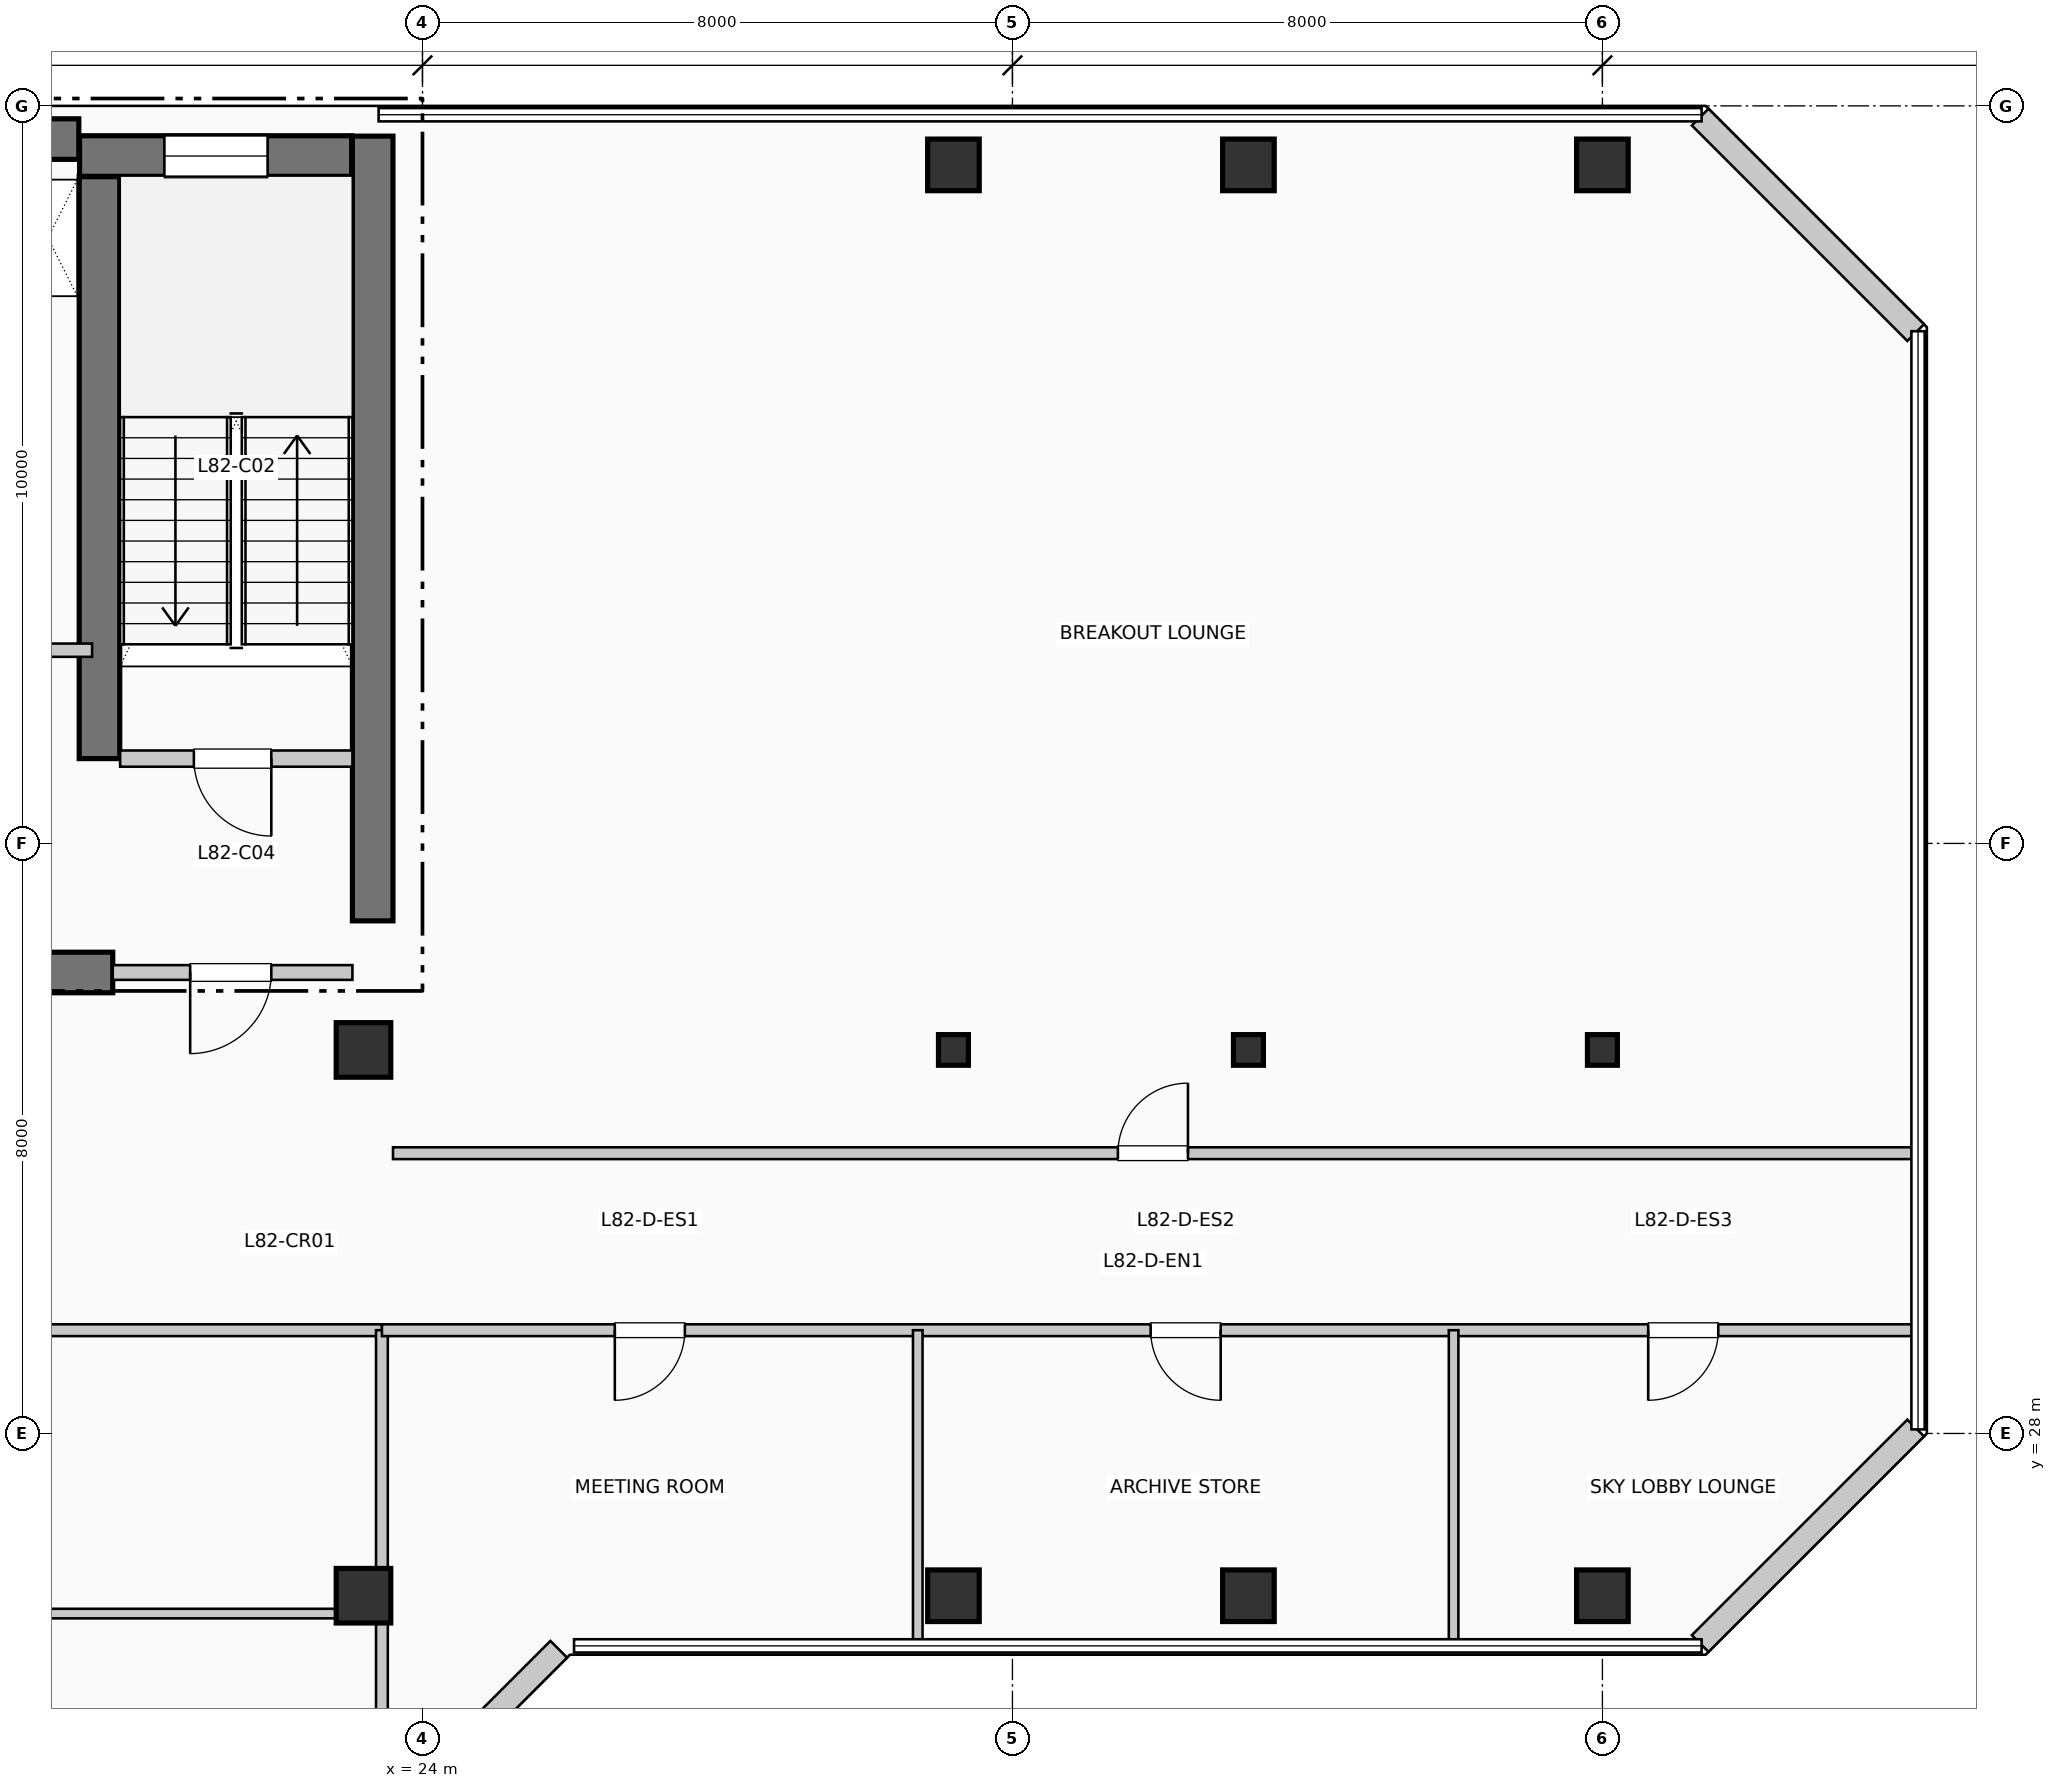
"""IFC4 building model, lengths in metres.
Left out: names, types, materials, properties, quantities, classifications, styles, units other than length and angle.
Written with IfcOpenShell. Run it as: python <this file> out.ifc"""

import sys

from ifc_helpers import new_model, si_unit, direction, frame, frame_2d, origin, origin_2d, place, context, subcontext, project, spatial, rectangle, i_section, extrude, element, fill, save


model = new_model("IFC4")
c1 = context("Model", 3, precision=1e-05, world=origin(), true_north=direction((0.0, 1.0)))
c2 = subcontext(c1, "Body", "Model", "MODEL_VIEW")
j1 = project(units=[si_unit("LENGTHUNIT", "METRE"), si_unit("PLANEANGLEUNIT", "RADIAN")], contexts=[c1])
p1 = place(None, origin())
s1 = spatial("IfcSite", under=j1, at=p1, CompositionType="ELEMENT")
p2 = place(p1, origin())
s2 = spatial("IfcBuilding", under=s1, at=p2, CompositionType="ELEMENT")
p3 = place(p2, frame((0.0, 0.0, 335.61)))
s3 = spatial("IfcBuildingStorey", under=s2, at=p3, CompositionType="ELEMENT", Elevation=335.61)
p4 = place(p3, frame((5.36, 45.55, 0.0), z_axis=(0.0, 0.0, 1.0), x_axis=(1.0, 0.0, 0.0)))
e1 = element("IfcWall", 1, at=p4, inside=s3, PredefinedType="SHEAR", context=c2, shape_type="SweptSolid", body=[
    extrude(rectangle(XDim=13.98, YDim=0.55, at=frame_2d((6.99, 0.0))), origin(), (0.0, 0.0, 1.0), 3.96),
])
p5 = place(p3, frame((23.325, 34.95, 0.0), z_axis=(0.0, 0.0, 1.0), x_axis=(0.0, 1.0, 0.0)))
e2 = element("IfcWall", 2, at=p5, inside=s3, PredefinedType="SHEAR", context=c2, shape_type="SweptSolid", body=[
    extrude(rectangle(XDim=10.64, YDim=0.55, at=frame_2d((5.32, 0.0))), origin(), (0.0, 0.0, 1.0), 3.96),
])
p6 = place(p3, frame((13.68, 34.25, 0.0), z_axis=(0.0, 0.0, 1.0), x_axis=(1.0, 0.0, 0.0)))
e3 = element("IfcWall", 3, at=p6, inside=s3, PredefinedType="SHEAR", context=c2, shape_type="SweptSolid", body=[
    extrude(rectangle(XDim=6.12, YDim=0.55, at=frame_2d((3.06, 0.0))), origin(), (0.0, 0.0, 1.0), 3.96),
])
p7 = place(p3, frame((19.62, 37.15, 0.0), z_axis=(0.0, 0.0, 1.0), x_axis=(0.0, 1.0, 0.0)))
e4 = element("IfcWall", 4, at=p7, inside=s3, PredefinedType="SHEAR", context=c2, shape_type="SweptSolid", body=[
    extrude(rectangle(XDim=7.89, YDim=0.55, at=frame_2d((3.945, 0.0))), origin(), (0.0, 0.0, 1.0), 3.96),
])
p8 = place(p3, frame((19.35, 45.32, 0.0), z_axis=(0.0, 0.0, 1.0), x_axis=(1.0, 0.0, 0.0)))
e5 = element("IfcWall", 5, at=p8, inside=s3, PredefinedType="SHEAR", context=c2, shape_type="SweptSolid", body=[
    extrude(rectangle(XDim=3.69, YDim=0.55, at=frame_2d((1.845, 0.0))), origin(), (0.0, 0.0, 1.0), 3.96),
])
p9 = place(p8, frame((1.15, 0.0, 1.05)))
e6 = element("IfcOpeningElement", 6, at=p9, cuts=e5, PredefinedType="OPENING", context=c2, shape_type="SweptSolid", body=[
    extrude(rectangle(XDim=1.4, YDim=1.8, at=frame_2d((0.7, 0.9))), frame((0.0, 0.285, 0.0), z_axis=(0.0, -1.0, 0.0), x_axis=(1.0, 0.0, 0.0)), (0.0, 0.0, 1.0), 0.57),
])
for number, where, z_axis, x_axis in (
    (7, (23.2, 25.8, 0.0), (0.0, 0.0, 1.0), (1.0, 0.0, 0.0)),
    (8, (23.2, 33.2, 0.0), (0.0, 0.0, 1.0), (1.0, 0.0, 0.0)),
):
    element("IfcColumn", number, at=place(p3, frame(where, z_axis=z_axis, x_axis=x_axis)), inside=s3, PredefinedType="COLUMN", context=c2, shape_type="SweptSolid", body=[
        extrude(rectangle(XDim=0.74, YDim=0.74, at=origin_2d()), origin(), (0.0, 0.0, 1.0), 3.96),
    ])
p10 = place(p3, frame((31.2, 25.8, 0.0), z_axis=(0.0, 0.0, 1.0), x_axis=(1.0, 0.0, 0.0)))
e9 = element("IfcColumn", 9, at=p10, inside=s3, PredefinedType="COLUMN", context=c2, shape_type="SweptSolid", body=[
    extrude(rectangle(XDim=0.7, YDim=0.7, at=origin_2d()), origin(), (0.0, 0.0, 1.0), 3.96),
])
p11 = place(p3, frame((31.2, 33.2, 0.0), z_axis=(0.0, 0.0, 1.0), x_axis=(1.0, 0.0, 0.0)))
e10 = element("IfcColumn", 10, at=p11, inside=s3, PredefinedType="COLUMN", context=c2, shape_type="SweptSolid", body=[
    extrude(i_section(OverallWidth=0.406, OverallDepth=0.416, WebThickness=0.022, FlangeThickness=0.036, at=origin_2d()), origin(), (0.0, 0.0, 1.0), 3.96),
])
for number, where, z_axis, x_axis in (
    (11, (31.2, 45.2, 0.0), (0.0, 0.0, 1.0), (1.0, 0.0, 0.0)),
    (12, (35.2, 25.8, 0.0), (0.0, 0.0, 1.0), (1.0, 0.0, 0.0)),
):
    element("IfcColumn", number, at=place(p3, frame(where, z_axis=z_axis, x_axis=x_axis)), inside=s3, PredefinedType="COLUMN", context=c2, shape_type="SweptSolid", body=[
        extrude(rectangle(XDim=0.7, YDim=0.7, at=origin_2d()), origin(), (0.0, 0.0, 1.0), 3.96),
    ])
p12 = place(p3, frame((35.2, 33.2, 0.0), z_axis=(0.0, 0.0, 1.0), x_axis=(1.0, 0.0, 0.0)))
e13 = element("IfcColumn", 13, at=p12, inside=s3, PredefinedType="COLUMN", context=c2, shape_type="SweptSolid", body=[
    extrude(i_section(OverallWidth=0.406, OverallDepth=0.416, WebThickness=0.022, FlangeThickness=0.036, at=origin_2d()), origin(), (0.0, 0.0, 1.0), 3.96),
])
for number, where, z_axis, x_axis in (
    (14, (35.2, 45.2, 0.0), (0.0, 0.0, 1.0), (1.0, 0.0, 0.0)),
    (15, (40.0, 25.8, 0.0), (0.0, 0.0, 1.0), (1.0, 0.0, 0.0)),
):
    element("IfcColumn", number, at=place(p3, frame(where, z_axis=z_axis, x_axis=x_axis)), inside=s3, PredefinedType="COLUMN", context=c2, shape_type="SweptSolid", body=[
        extrude(rectangle(XDim=0.7, YDim=0.7, at=origin_2d()), origin(), (0.0, 0.0, 1.0), 3.96),
    ])
p13 = place(p3, frame((40.0, 33.2, 0.0), z_axis=(0.0, 0.0, 1.0), x_axis=(1.0, 0.0, 0.0)))
e16 = element("IfcColumn", 16, at=p13, inside=s3, PredefinedType="COLUMN", context=c2, shape_type="SweptSolid", body=[
    extrude(i_section(OverallWidth=0.406, OverallDepth=0.416, WebThickness=0.022, FlangeThickness=0.036, at=origin_2d()), origin(), (0.0, 0.0, 1.0), 3.96),
])
p14 = place(p3, frame((40.0, 45.2, 0.0), z_axis=(0.0, 0.0, 1.0), x_axis=(1.0, 0.0, 0.0)))
e17 = element("IfcColumn", 17, at=p14, inside=s3, PredefinedType="COLUMN", context=c2, shape_type="SweptSolid", body=[
    extrude(rectangle(XDim=0.7, YDim=0.7, at=origin_2d()), origin(), (0.0, 0.0, 1.0), 3.96),
])
p15 = place(p3, frame((23.926, 23.152, 0.0), z_axis=(0.0, 0.0, 1.0), x_axis=(0.707106781187, 0.707106781187, 0.0)))
e18 = element("IfcWall", 18, at=p15, inside=s3, PredefinedType="SOLIDWALL", context=c2, shape_type="SweptSolid", body=[
    extrude(rectangle(XDim=2.718, YDim=0.32, at=frame_2d((1.359, 0.0))), origin(), (0.0, 0.0, 1.0), 3.74),
])
for number, where, z_axis, x_axis in (
    (19, (41.326, 25.152, 0.0), (0.0, 0.0, 1.0), (0.707, 0.707, 0.0)),
    (20, (44.248, 42.926, 0.0), (0.0, 0.0, 1.0), (-0.707, 0.707, 0.0)),
):
    element("IfcWall", number, at=place(p3, frame(where, z_axis=z_axis, x_axis=x_axis)), inside=s3, PredefinedType="SOLIDWALL", context=c2, shape_type="SweptSolid", body=[
        extrude(rectangle(XDim=4.133, YDim=0.32, at=frame_2d((2.066, 0.0))), origin(), (0.0, 0.0, 1.0), 3.74),
    ])
p16 = place(p3, frame((19.9, 37.15, 0.0), z_axis=(0.0, 0.0, 1.0), x_axis=(1.0, 0.0, 0.0)))
e21 = element("IfcWall", 21, at=p16, inside=s3, PredefinedType="PARTITIONING", context=c2, shape_type="SweptSolid", body=[
    extrude(rectangle(XDim=3.15, YDim=0.22, at=frame_2d((1.575, 0.0))), origin(), (0.0, 0.0, 1.0), 3.74),
])
p17 = place(p16, frame((2.05, 0.0, 0.0), z_axis=(0.0, 0.0, 1.0), x_axis=(-1.0, 0.0, 0.0)))
e22 = element("IfcOpeningElement", 22, at=p17, cuts=e21, PredefinedType="OPENING", context=c2, shape_type="SweptSolid", body=[
    extrude(rectangle(XDim=1.05, YDim=2.15, at=frame_2d((0.525, 1.075))), frame((0.0, 0.12, 0.0), z_axis=(0.0, -1.0, 0.0), x_axis=(1.0, 0.0, 0.0)), (0.0, 0.0, 1.0), 0.24),
])
p18 = place(p3, frame((19.8, 34.25, 0.0), z_axis=(0.0, 0.0, 1.0), x_axis=(1.0, 0.0, 0.0)))
e23 = element("IfcWall", 23, at=p18, inside=s3, PredefinedType="PARTITIONING", context=c2, shape_type="SweptSolid", body=[
    extrude(rectangle(XDim=3.25, YDim=0.2, at=frame_2d((1.625, 0.0))), origin(), (0.0, 0.0, 1.0), 3.74),
])
p19 = place(p18, frame((2.15, 0.0, 0.0), z_axis=(0.0, 0.0, 1.0), x_axis=(-1.0, 0.0, 0.0)))
e24 = element("IfcOpeningElement", 24, at=p19, cuts=e23, PredefinedType="OPENING", context=c2, shape_type="SweptSolid", body=[
    extrude(rectangle(XDim=1.1, YDim=2.15, at=frame_2d((0.55, 1.075))), frame((0.0, 0.11, 0.0), z_axis=(0.0, -1.0, 0.0), x_axis=(1.0, 0.0, 0.0)), (0.0, 0.0, 1.0), 0.22),
])
p20 = place(p3, frame((17.68, 38.62, 0.0), z_axis=(0.0, 0.0, 1.0), x_axis=(1.0, 0.0, 0.0)))
e25 = element("IfcWall", 25, at=p20, inside=s3, PredefinedType="PARTITIONING", context=c2, shape_type="SweptSolid", body=[
    extrude(rectangle(XDim=1.84, YDim=0.18, at=frame_2d((0.92, 0.0))), origin(), (0.0, 0.0, 1.0), 3.74),
])
p21 = place(p20, frame((0.24, 0.0, 0.0)))
e26 = element("IfcOpeningElement", 26, at=p21, cuts=e25, PredefinedType="OPENING", context=c2, shape_type="SweptSolid", body=[
    extrude(rectangle(XDim=0.92, YDim=2.1, at=frame_2d((0.46, 1.05))), frame((0.0, 0.1, 0.0), z_axis=(0.0, -1.0, 0.0), x_axis=(1.0, 0.0, 0.0)), (0.0, 0.0, 1.0), 0.2),
])
p22 = place(p3, frame((6.4, 29.4, 0.0), z_axis=(0.0, 0.0, 1.0), x_axis=(1.0, 0.0, 0.0)))
e27 = element("IfcWall", 27, at=p22, inside=s3, PredefinedType="PARTITIONING", context=c2, shape_type="SweptSolid", body=[
    extrude(rectangle(XDim=17.05, YDim=0.16, at=frame_2d((8.525, 0.0))), origin(), (0.0, 0.0, 1.0), 3.425),
])
p23 = place(p3, frame((23.45, 5.99, 0.0), z_axis=(0.0, 0.0, 1.0), x_axis=(0.0, 1.0, 0.0)))
e28 = element("IfcWall", 28, at=p23, inside=s3, PredefinedType="PARTITIONING", context=c2, shape_type="SweptSolid", body=[
    extrude(rectangle(XDim=23.41, YDim=0.16, at=frame_2d((11.705, 0.0))), origin(), (0.0, 0.0, 1.0), 3.175),
])
p24 = place(p3, frame((6.4, 25.558, 0.0), z_axis=(0.0, 0.0, 1.0), x_axis=(1.0, 0.0, 0.0)))
e29 = element("IfcWall", 29, at=p24, inside=s3, PredefinedType="PARTITIONING", context=c2, shape_type="SweptSolid", body=[
    extrude(rectangle(XDim=17.05, YDim=0.13, at=frame_2d((8.525, 0.0))), origin(), (0.0, 0.0, 1.0), 3.175),
])
p25 = place(p3, frame((23.45, 29.4, 0.0), z_axis=(0.0, 0.0, 1.0), x_axis=(1.0, 0.0, 0.0)))
e30 = element("IfcWall", 30, at=p25, inside=s3, PredefinedType="PARTITIONING", context=c2, shape_type="SweptSolid", body=[
    extrude(rectangle(XDim=20.76, YDim=0.16, at=frame_2d((10.38, 0.0))), origin(), (0.0, 0.0, 1.0), 3.425),
])
p26 = place(p25, frame((4.108, 0.0, 0.0), z_axis=(0.0, 0.0, 1.0), x_axis=(-1.0, 0.0, 0.0)))
e31 = element("IfcOpeningElement", 31, at=p26, cuts=e30, PredefinedType="OPENING", context=c2, shape_type="SweptSolid", body=[
    extrude(rectangle(XDim=0.95, YDim=2.15, at=frame_2d((0.475, 1.075))), frame((0.0, 0.09, 0.0), z_axis=(0.0, -1.0, 0.0), x_axis=(1.0, 0.0, 0.0)), (0.0, 0.0, 1.0), 0.18),
])
p27 = place(p25, frame((11.374, 0.0, 0.0), z_axis=(0.0, 0.0, 1.0), x_axis=(-1.0, 0.0, 0.0)))
e32 = element("IfcOpeningElement", 32, at=p27, cuts=e30, PredefinedType="OPENING", context=c2, shape_type="SweptSolid", body=[
    extrude(rectangle(XDim=0.95, YDim=2.15, at=frame_2d((0.475, 1.075))), frame((0.0, 0.09, 0.0), z_axis=(0.0, -1.0, 0.0), x_axis=(1.0, 0.0, 0.0)), (0.0, 0.0, 1.0), 0.18),
])
p28 = place(p25, frame((18.121, 0.0, 0.0), z_axis=(0.0, 0.0, 1.0), x_axis=(-1.0, 0.0, 0.0)))
e33 = element("IfcOpeningElement", 33, at=p28, cuts=e30, PredefinedType="OPENING", context=c2, shape_type="SweptSolid", body=[
    extrude(rectangle(XDim=0.95, YDim=2.15, at=frame_2d((0.475, 1.075))), frame((0.0, 0.09, 0.0), z_axis=(0.0, -1.0, 0.0), x_axis=(1.0, 0.0, 0.0)), (0.0, 0.0, 1.0), 0.18),
])
p29 = place(p3, frame((23.6, 31.8, 0.0), z_axis=(0.0, 0.0, 1.0), x_axis=(1.0, 0.0, 0.0)))
e34 = element("IfcWall", 34, at=p29, inside=s3, PredefinedType="PARTITIONING", context=c2, shape_type="SweptSolid", body=[
    extrude(rectangle(XDim=20.61, YDim=0.16, at=frame_2d((10.305, 0.0))), origin(), (0.0, 0.0, 1.0), 3.74),
])
p30 = place(p29, frame((9.83, 0.0, 0.0)))
e35 = element("IfcOpeningElement", 35, at=p30, cuts=e34, PredefinedType="OPENING", context=c2, shape_type="SweptSolid", body=[
    extrude(rectangle(XDim=0.95, YDim=2.15, at=frame_2d((0.475, 1.075))), frame((0.0, 0.09, 0.0), z_axis=(0.0, -1.0, 0.0), x_axis=(1.0, 0.0, 0.0)), (0.0, 0.0, 1.0), 0.18),
])
for number, where, z_axis, x_axis in (
    (36, (30.716, 25.19, 0.0), (0.0, 0.0, 1.0), (0.0, 1.0, 0.0)),
    (37, (37.982, 25.19, 0.0), (0.0, 0.0, 1.0), (0.0, 1.0, 0.0)),
):
    element("IfcWall", number, at=place(p3, frame(where, z_axis=z_axis, x_axis=x_axis)), inside=s3, PredefinedType="PARTITIONING", context=c2, shape_type="SweptSolid", body=[
        extrude(rectangle(XDim=4.21, YDim=0.13, at=frame_2d((2.105, 0.0))), origin(), (0.0, 0.0, 1.0), 3.74),
    ])
p31 = place(p9, origin())
e38 = element("IfcWindow", 38, at=p31, inside=s3, PartitioningType="SINGLE_PANEL", PredefinedType="WINDOW", context=c2, shape_type="SweptSolid", body=[
    extrude(rectangle(XDim=1.4, YDim=1.8, at=frame_2d((0.7, 0.9))), frame((0.0, 0.03, 0.0), z_axis=(0.0, -1.0, 0.0), x_axis=(1.0, 0.0, 0.0)), (0.0, 0.0, 1.0), 0.06),
])
fill(e6, e38)
p32 = place(p17, origin())
e39 = element("IfcDoor", 39, at=p32, inside=s3, OperationType="SINGLE_SWING_RIGHT", PredefinedType="DOOR", context=c2, shape_type="SweptSolid", body=[
    extrude(rectangle(XDim=1.05, YDim=2.15, at=frame_2d((0.525, 1.075))), frame((0.0, 0.025, 0.0), z_axis=(0.0, -1.0, 0.0), x_axis=(1.0, 0.0, 0.0)), (0.0, 0.0, 1.0), 0.05),
])
fill(e22, e39)
p33 = place(p19, origin())
e40 = element("IfcDoor", 40, at=p33, inside=s3, OperationType="SINGLE_SWING_LEFT", PredefinedType="DOOR", context=c2, shape_type="SweptSolid", body=[
    extrude(rectangle(XDim=1.1, YDim=2.15, at=frame_2d((0.55, 1.075))), frame((0.0, 0.025, 0.0), z_axis=(0.0, -1.0, 0.0), x_axis=(1.0, 0.0, 0.0)), (0.0, 0.0, 1.0), 0.05),
])
fill(e24, e40)
p34 = place(p26, origin())
e41 = element("IfcDoor", 41, at=p34, inside=s3, OperationType="SINGLE_SWING_LEFT", PredefinedType="DOOR", context=c2, shape_type="SweptSolid", body=[
    extrude(rectangle(XDim=0.95, YDim=2.15, at=frame_2d((0.475, 1.075))), frame((0.0, 0.025, 0.0), z_axis=(0.0, -1.0, 0.0), x_axis=(1.0, 0.0, 0.0)), (0.0, 0.0, 1.0), 0.05),
])
fill(e31, e41)
p35 = place(p27, origin())
e42 = element("IfcDoor", 42, at=p35, inside=s3, OperationType="SINGLE_SWING_RIGHT", PredefinedType="DOOR", context=c2, shape_type="SweptSolid", body=[
    extrude(rectangle(XDim=0.95, YDim=2.15, at=frame_2d((0.475, 1.075))), frame((0.0, 0.025, 0.0), z_axis=(0.0, -1.0, 0.0), x_axis=(1.0, 0.0, 0.0)), (0.0, 0.0, 1.0), 0.05),
])
fill(e32, e42)
p36 = place(p28, origin())
e43 = element("IfcDoor", 43, at=p36, inside=s3, OperationType="SINGLE_SWING_LEFT", PredefinedType="DOOR", context=c2, shape_type="SweptSolid", body=[
    extrude(rectangle(XDim=0.95, YDim=2.15, at=frame_2d((0.475, 1.075))), frame((0.0, 0.025, 0.0), z_axis=(0.0, -1.0, 0.0), x_axis=(1.0, 0.0, 0.0)), (0.0, 0.0, 1.0), 0.05),
])
fill(e33, e43)
p37 = place(p30, origin())
e44 = element("IfcDoor", 44, at=p37, inside=s3, OperationType="SINGLE_SWING_RIGHT", PredefinedType="DOOR", context=c2, shape_type="SweptSolid", body=[
    extrude(rectangle(XDim=0.95, YDim=2.15, at=frame_2d((0.475, 1.075))), frame((0.0, 0.025, 0.0), z_axis=(0.0, -1.0, 0.0), x_axis=(1.0, 0.0, 0.0)), (0.0, 0.0, 1.0), 0.05),
])
fill(e35, e44)
save(model, sys.argv[1])
